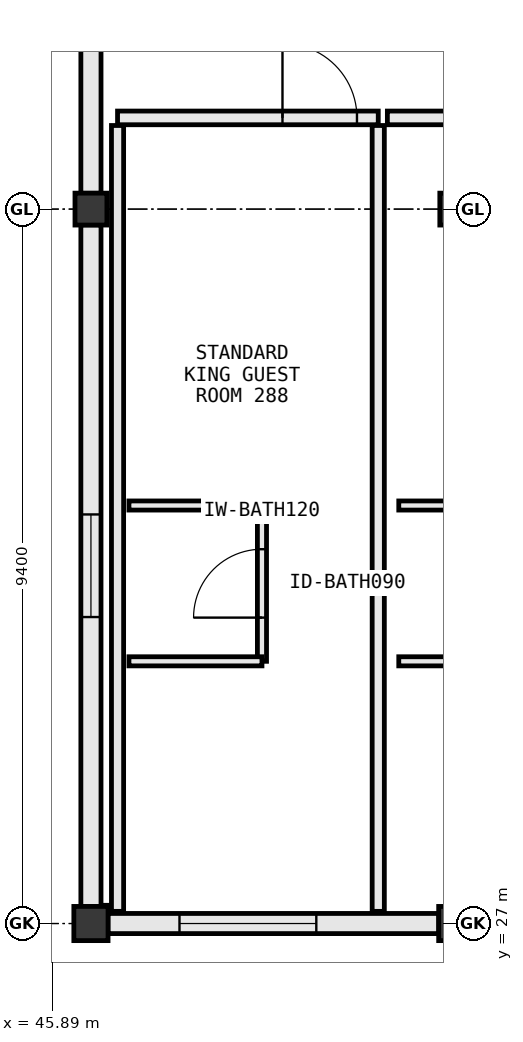
"""IFC4 building model, lengths in metres.
Left out: names, types, materials, properties, quantities, classifications, styles, units other than length and angle.
Written with IfcOpenShell. Run it as: python <this file> out.ifc"""

import sys

from ifc_helpers import new_model, si_unit, direction, frame, frame_2d, origin, origin_2d, place, context, subcontext, project, spatial, rectangle, extrude, element, fill, save


model = new_model("IFC4")
c1 = context("Model", 3, precision=1e-05, world=origin(), true_north=direction((0.0, 1.0)))
c2 = subcontext(c1, "Body", "Model", "MODEL_VIEW")
j1 = project(units=[si_unit("LENGTHUNIT", "METRE"), si_unit("PLANEANGLEUNIT", "RADIAN")], contexts=[c1])
p1 = place(None, origin())
s1 = spatial("IfcSite", under=j1, at=p1, CompositionType="ELEMENT")
p2 = place(p1, origin())
s2 = spatial("IfcBuilding", under=s1, at=p2, CompositionType="ELEMENT")
p3 = place(p2, frame((0.0, 0.0, 42.8)))
s3 = spatial("IfcBuildingStorey", under=s2, at=p3, CompositionType="ELEMENT", Elevation=42.8)
p4 = place(p3, frame((46.4, 27.0, 0.0), z_axis=(0.0, 0.0, 1.0), x_axis=(1.0, 0.0, 0.0)))
e1 = element("IfcColumn", 1, at=p4, inside=s3, PredefinedType="COLUMN", context=c2, shape_type="SweptSolid", body=[
    extrude(rectangle(XDim=0.45, YDim=0.45, at=origin_2d()), origin(), (0.0, 0.0, 1.0), 3.54),
])
p5 = place(p3, frame((46.4, 36.4, 0.0), z_axis=(0.0, 0.0, 1.0), x_axis=(1.0, 0.0, 0.0)))
e2 = element("IfcColumn", 2, at=p5, inside=s3, PredefinedType="COLUMN", context=c2, shape_type="SweptSolid", body=[
    extrude(rectangle(XDim=0.42, YDim=0.42, at=origin_2d()), origin(), (0.0, 0.0, 1.0), 3.54),
])
p6 = place(p3, frame((51.2, 27.0, 0.0), z_axis=(0.0, 0.0, 1.0), x_axis=(1.0, 0.0, 0.0)))
e3 = element("IfcColumn", 3, at=p6, inside=s3, PredefinedType="COLUMN", context=c2, shape_type="SweptSolid", body=[
    extrude(rectangle(XDim=0.45, YDim=0.45, at=origin_2d()), origin(), (0.0, 0.0, 1.0), 3.8),
])
p7 = place(p3, frame((51.2, 36.4, 0.0), z_axis=(0.0, 0.0, 1.0), x_axis=(1.0, 0.0, 0.0)))
e4 = element("IfcColumn", 4, at=p7, inside=s3, PredefinedType="COLUMN", context=c2, shape_type="SweptSolid", body=[
    extrude(rectangle(XDim=0.42, YDim=0.42, at=origin_2d()), origin(), (0.0, 0.0, 1.0), 3.8),
])
p8 = place(p3, frame((46.4, 46.992, 0.0), z_axis=(0.0, 0.0, 1.0), x_axis=(0.0, -1.0, 0.0)))
e5 = element("IfcWall", 5, at=p8, inside=s3, PredefinedType="STANDARD", context=c2, shape_type="SweptSolid", body=[
    extrude(rectangle(XDim=10.384, YDim=0.265, at=frame_2d((5.192, 0.0))), origin(), (0.0, 0.0, 1.0), 2.895),
])
p9 = place(p8, frame((1.921, 0.0, 0.85)))
e6 = element("IfcOpeningElement", 6, at=p9, cuts=e5, PredefinedType="OPENING", context=c2, shape_type="SweptSolid", body=[
    extrude(rectangle(XDim=1.35, YDim=1.65, at=frame_2d((0.675, 0.825))), frame((0.0, 0.145, 0.0), z_axis=(0.0, -1.0, 0.0), x_axis=(1.0, 0.0, 0.0)), (0.0, 0.0, 1.0), 0.289),
])
p10 = place(p8, frame((7.113, 0.0, 0.85)))
e7 = element("IfcOpeningElement", 7, at=p10, cuts=e5, PredefinedType="OPENING", context=c2, shape_type="SweptSolid", body=[
    extrude(rectangle(XDim=1.35, YDim=1.65, at=frame_2d((0.675, 0.825))), frame((0.0, 0.145, 0.0), z_axis=(0.0, -1.0, 0.0), x_axis=(1.0, 0.0, 0.0)), (0.0, 0.0, 1.0), 0.289),
])
p11 = place(p3, frame((46.4, 36.192, 0.0), z_axis=(0.0, 0.0, 1.0), x_axis=(0.0, -1.0, 0.0)))
e8 = element("IfcWall", 8, at=p11, inside=s3, PredefinedType="STANDARD", context=c2, shape_type="SweptSolid", body=[
    extrude(rectangle(XDim=8.969, YDim=0.265, at=frame_2d((4.484, 0.0))), origin(), (0.0, 0.0, 1.0), 2.915),
])
p12 = place(p11, frame((3.81, 0.0, 0.85)))
e9 = element("IfcOpeningElement", 9, at=p12, cuts=e8, PredefinedType="OPENING", context=c2, shape_type="SweptSolid", body=[
    extrude(rectangle(XDim=1.35, YDim=1.65, at=frame_2d((0.675, 0.825))), frame((0.0, 0.145, 0.0), z_axis=(0.0, -1.0, 0.0), x_axis=(1.0, 0.0, 0.0)), (0.0, 0.0, 1.0), 0.289),
])
p13 = place(p3, frame((46.623, 27.0, 0.0), z_axis=(0.0, 0.0, 1.0), x_axis=(1.0, 0.0, 0.0)))
e10 = element("IfcWall", 10, at=p13, inside=s3, PredefinedType="STANDARD", context=c2, shape_type="SweptSolid", body=[
    extrude(rectangle(XDim=4.354, YDim=0.265, at=frame_2d((2.177, 0.0))), origin(), (0.0, 0.0, 1.0), 2.995),
])
p14 = place(p13, frame((0.942, 0.0, 0.85)))
e11 = element("IfcOpeningElement", 11, at=p14, cuts=e10, PredefinedType="OPENING", context=c2, shape_type="SweptSolid", body=[
    extrude(rectangle(XDim=1.8, YDim=1.85, at=frame_2d((0.9, 0.925))), frame((0.0, 0.145, 0.0), z_axis=(0.0, -1.0, 0.0), x_axis=(1.0, 0.0, 0.0)), (0.0, 0.0, 1.0), 0.289),
])
p15 = place(p3, frame((50.18, 37.6, 0.0), z_axis=(0.0, 0.0, 1.0), x_axis=(-1.0, 0.0, 0.0)))
e12 = element("IfcWall", 12, at=p15, inside=s3, PredefinedType="PARTITIONING", context=c2, shape_type="SweptSolid", body=[
    extrude(rectangle(XDim=3.43, YDim=0.18, at=frame_2d((1.715, 0.0))), origin(), (0.0, 0.0, 1.0), 3.54),
])
p16 = place(p15, frame((0.28, 0.0, 0.0)))
e13 = element("IfcOpeningElement", 13, at=p16, cuts=e12, PredefinedType="OPENING", context=c2, shape_type="SweptSolid", body=[
    extrude(rectangle(XDim=0.98, YDim=2.18, at=frame_2d((0.49, 1.09))), frame((0.0, 0.102, 0.0), z_axis=(0.0, -1.0, 0.0), x_axis=(1.0, 0.0, 0.0)), (0.0, 0.0, 1.0), 0.204),
])
p17 = place(p3, frame((46.75, 27.16, 0.0), z_axis=(0.0, 0.0, 1.0), x_axis=(0.0, 1.0, 0.0)))
e14 = element("IfcWall", 14, at=p17, inside=s3, PredefinedType="PARTITIONING", context=c2, shape_type="SweptSolid", body=[
    extrude(rectangle(XDim=10.34, YDim=0.16, at=frame_2d((5.17, 0.0))), origin(), (0.0, 0.0, 1.0), 2.895),
])
p18 = place(p3, frame((50.18, 27.16, 0.0), z_axis=(0.0, 0.0, 1.0), x_axis=(0.0, 1.0, 0.0)))
e15 = element("IfcWall", 15, at=p18, inside=s3, PredefinedType="PARTITIONING", context=c2, shape_type="SweptSolid", body=[
    extrude(rectangle(XDim=10.34, YDim=0.16, at=frame_2d((5.17, 0.0))), origin(), (0.0, 0.0, 1.0), 3.54),
])
p19 = place(p3, frame((46.9, 32.5, 0.0), z_axis=(0.0, 0.0, 1.0), x_axis=(1.0, 0.0, 0.0)))
e16 = element("IfcWall", 16, at=p19, inside=s3, PredefinedType="PARTITIONING", context=c2, shape_type="SweptSolid", body=[
    extrude(rectangle(XDim=1.75, YDim=0.12, at=frame_2d((0.875, 0.0))), origin(), (0.0, 0.0, 1.0), 3.54),
])
p20 = place(p3, frame((48.65, 30.45, 0.0), z_axis=(0.0, 0.0, 1.0), x_axis=(0.0, 1.0, 0.0)))
e17 = element("IfcWall", 17, at=p20, inside=s3, PredefinedType="PARTITIONING", context=c2, shape_type="SweptSolid", body=[
    extrude(rectangle(XDim=2.05, YDim=0.12, at=frame_2d((1.025, 0.0))), origin(), (0.0, 0.0, 1.0), 3.085),
])
p21 = place(p20, frame((0.575, 0.0, 0.0)))
e18 = element("IfcOpeningElement", 18, at=p21, cuts=e17, PredefinedType="OPENING", context=c2, shape_type="SweptSolid", body=[
    extrude(rectangle(XDim=0.9, YDim=2.15, at=frame_2d((0.45, 1.075))), frame((0.0, 0.072, 0.0), z_axis=(0.0, -1.0, 0.0), x_axis=(1.0, 0.0, 0.0)), (0.0, 0.0, 1.0), 0.144),
])
p22 = place(p3, frame((46.9, 30.45, 0.0), z_axis=(0.0, 0.0, 1.0), x_axis=(1.0, 0.0, 0.0)))
e19 = element("IfcWall", 19, at=p22, inside=s3, PredefinedType="PARTITIONING", context=c2, shape_type="SweptSolid", body=[
    extrude(rectangle(XDim=1.75, YDim=0.12, at=frame_2d((0.875, 0.0))), origin(), (0.0, 0.0, 1.0), 3.54),
])
p23 = place(p3, frame((53.73, 37.6, 0.0), z_axis=(0.0, 0.0, 1.0), x_axis=(-1.0, 0.0, 0.0)))
e20 = element("IfcWall", 20, at=p23, inside=s3, PredefinedType="PARTITIONING", context=c2, shape_type="SweptSolid", body=[
    extrude(rectangle(XDim=3.43, YDim=0.18, at=frame_2d((1.715, 0.0))), origin(), (0.0, 0.0, 1.0), 3.54),
])
p24 = place(p23, frame((0.28, 0.0, 0.0)))
e21 = element("IfcOpeningElement", 21, at=p24, cuts=e20, PredefinedType="OPENING", context=c2, shape_type="SweptSolid", body=[
    extrude(rectangle(XDim=0.98, YDim=2.18, at=frame_2d((0.49, 1.09))), frame((0.0, 0.102, 0.0), z_axis=(0.0, -1.0, 0.0), x_axis=(1.0, 0.0, 0.0)), (0.0, 0.0, 1.0), 0.204),
])
for number, where, z_axis, x_axis in (
    (22, (50.45, 32.5, 0.0), (0.0, 0.0, 1.0), (1.0, 0.0, 0.0)),
    (23, (50.45, 30.45, 0.0), (0.0, 0.0, 1.0), (1.0, 0.0, 0.0)),
):
    element("IfcWall", number, at=place(p3, frame(where, z_axis=z_axis, x_axis=x_axis)), inside=s3, PredefinedType="PARTITIONING", context=c2, shape_type="SweptSolid", body=[
        extrude(rectangle(XDim=1.75, YDim=0.12, at=frame_2d((0.875, 0.0))), origin(), (0.0, 0.0, 1.0), 3.54),
    ])
p25 = place(p12, origin())
e24 = element("IfcWindow", 24, at=p25, inside=s3, PartitioningType="SINGLE_PANEL", PredefinedType="WINDOW", context=c2, shape_type="SweptSolid", body=[
    extrude(rectangle(XDim=1.35, YDim=1.65, at=frame_2d((0.675, 0.825))), frame((0.0, 0.03, 0.0), z_axis=(0.0, -1.0, 0.0), x_axis=(1.0, 0.0, 0.0)), (0.0, 0.0, 1.0), 0.06),
])
fill(e9, e24)
p26 = place(p14, origin())
e25 = element("IfcWindow", 25, at=p26, inside=s3, PartitioningType="SINGLE_PANEL", PredefinedType="WINDOW", context=c2, shape_type="SweptSolid", body=[
    extrude(rectangle(XDim=1.8, YDim=1.85, at=frame_2d((0.9, 0.925))), frame((0.0, 0.03, 0.0), z_axis=(0.0, -1.0, 0.0), x_axis=(1.0, 0.0, 0.0)), (0.0, 0.0, 1.0), 0.06),
])
fill(e11, e25)
p27 = place(p16, frame((0.98, 0.0, 0.0), z_axis=(0.0, 0.0, 1.0), x_axis=(-1.0, 0.0, 0.0)))
e26 = element("IfcDoor", 26, at=p27, inside=s3, OperationType="SINGLE_SWING_RIGHT", PredefinedType="DOOR", context=c2, shape_type="SweptSolid", body=[
    extrude(rectangle(XDim=0.98, YDim=2.18, at=frame_2d((0.49, 1.09))), frame((0.0, 0.025, 0.0), z_axis=(0.0, -1.0, 0.0), x_axis=(1.0, 0.0, 0.0)), (0.0, 0.0, 1.0), 0.05),
])
fill(e13, e26)
p28 = place(p21, origin())
e27 = element("IfcDoor", 27, at=p28, inside=s3, OperationType="SINGLE_SWING_LEFT", PredefinedType="DOOR", context=c2, shape_type="SweptSolid", body=[
    extrude(rectangle(XDim=0.9, YDim=2.15, at=frame_2d((0.45, 1.075))), frame((0.0, 0.025, 0.0), z_axis=(0.0, -1.0, 0.0), x_axis=(1.0, 0.0, 0.0)), (0.0, 0.0, 1.0), 0.05),
])
fill(e18, e27)
save(model, sys.argv[1])
